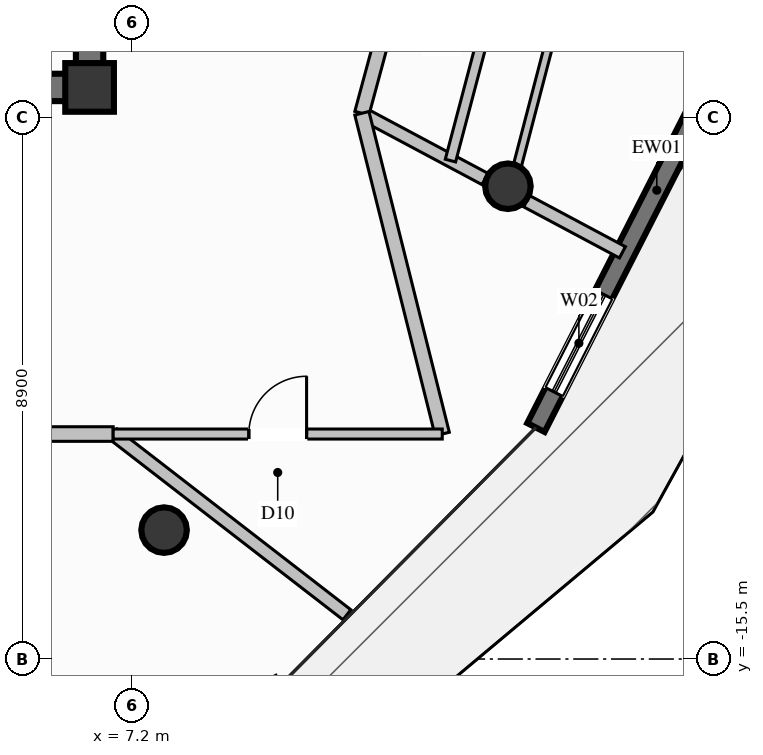
"""IFC4 building model, lengths in metres.
Left out: names, types, materials, properties, quantities, classifications, styles, units other than length and angle.
Written with IfcOpenShell. Run it as: python <this file> out.ifc"""

import sys

from ifc_helpers import new_model, si_unit, direction, frame, frame_2d, origin, origin_2d, place, context, subcontext, project, spatial, rectangle, circle, extrude, element, fill, save


model = new_model("IFC4")
c1 = context("Model", 3, precision=1e-05, world=origin(), true_north=direction((0.0, 1.0)))
c2 = subcontext(c1, "Body", "Model", "MODEL_VIEW")
j1 = project(units=[si_unit("LENGTHUNIT", "METRE"), si_unit("PLANEANGLEUNIT", "RADIAN")], contexts=[c1])
p1 = place(None, origin())
s1 = spatial("IfcSite", under=j1, at=p1, CompositionType="ELEMENT")
p2 = place(p1, origin())
s2 = spatial("IfcBuilding", under=s1, at=p2, CompositionType="ELEMENT")
p3 = place(p2, frame((0.0, 0.0, 282.0)))
s3 = spatial("IfcBuildingStorey", under=s2, at=p3, CompositionType="ELEMENT", Elevation=282.0)
p4 = place(p3, frame((6.5, -6.1, 0.0), z_axis=(0.0, 0.0, 1.0), x_axis=(1.0, 0.0, 0.0)))
e1 = element("IfcColumn", 1, at=p4, inside=s3, PredefinedType="COLUMN", context=c2, shape_type="SweptSolid", body=[
    extrude(rectangle(XDim=0.8, YDim=0.8, at=origin_2d()), origin(), (0.0, 0.0, 1.0), 3.8),
])
p5 = place(p3, frame((4.15, -6.1, 0.0), z_axis=(0.0, 0.0, 1.0), x_axis=(1.0, 0.0, 0.0)))
e2 = element("IfcWall", 2, at=p5, inside=s3, PredefinedType="SHEAR", context=c2, shape_type="SweptSolid", body=[
    extrude(rectangle(XDim=2.125, YDim=0.45, at=frame_2d((1.062, 0.0))), origin(), (0.0, 0.0, 1.0), 3.8),
])
p6 = place(p3, frame((6.5, -6.325, 0.0), z_axis=(0.0, 0.0, 1.0), x_axis=(0.0, 1.0, 0.0)))
e3 = element("IfcWall", 3, at=p6, inside=s3, PredefinedType="SHEAR", context=c2, shape_type="SweptSolid", body=[
    extrude(rectangle(XDim=3.975, YDim=0.45, at=frame_2d((1.987, 0.0))), origin(), (0.0, 0.0, 1.0), 3.8),
])
for number, where, z_axis, x_axis in (
    (4, (7.725, -13.38, 0.0), (0.0, 0.0, 1.0), (1.0, 0.0, 0.0)),
    (5, (13.38, -7.725, 0.0), (0.0, 0.0, 1.0), (1.0, 0.0, 0.0)),
):
    element("IfcColumn", number, at=place(p3, frame(where, z_axis=z_axis, x_axis=x_axis)), inside=s3, PredefinedType="COLUMN", context=c2, shape_type="SweptSolid", body=[
        extrude(circle(Radius=0.375, at=origin_2d()), origin(), (0.0, 0.0, 1.0), 3.8),
    ])
p7 = place(p3, frame((16.588, -6.299, 0.0), z_axis=(0.0, 0.0, 1.0), x_axis=(-0.453783790234, -0.891111817743, 0.0)))
e6 = element("IfcWall", 6, at=p7, inside=s3, PredefinedType="SOLIDWALL", context=c2, shape_type="SweptSolid", body=[
    extrude(rectangle(XDim=6.053, YDim=0.32, at=frame_2d((3.027, 0.0))), origin(), (0.0, 0.0, 1.0), 3.57),
])
p8 = place(p7, frame((3.597, 0.0, 0.35)))
e7 = element("IfcOpeningElement", 7, at=p8, cuts=e6, PredefinedType="OPENING", context=c2, shape_type="SweptSolid", body=[
    extrude(rectangle(XDim=1.8, YDim=2.6, at=frame_2d((0.9, 1.3))), frame((0.0, 0.17, 0.0), z_axis=(0.0, -1.0, 0.0), x_axis=(1.0, 0.0, 0.0)), (0.0, 0.0, 1.0), 0.34),
])
p9 = place(p3, frame((10.978, -6.525, 0.0), z_axis=(0.0, 0.0, 1.0), x_axis=(0.882152653626, -0.470963582138, 0.0)))
e8 = element("IfcWall", 8, at=p9, inside=s3, PredefinedType="PARTITIONING", context=c2, shape_type="SweptSolid", body=[
    extrude(rectangle(XDim=2.295, YDim=0.21, at=frame_2d((1.148, 0.0))), origin(), (0.0, 0.0, 1.0), 3.085),
])
p10 = place(p3, frame((13.689, -7.972, 0.0), z_axis=(0.0, 0.0, 1.0), x_axis=(0.882205167705, -0.470865205844, 0.0)))
e9 = element("IfcWall", 9, at=p10, inside=s3, PredefinedType="PARTITIONING", context=c2, shape_type="SweptSolid", body=[
    extrude(rectangle(XDim=1.784, YDim=0.21, at=frame_2d((0.892, 0.0))), origin(), (0.0, 0.0, 1.0), 3.57),
])
p11 = place(p3, frame((10.978, -6.525, 0.0), z_axis=(0.0, 0.0, 1.0), x_axis=(0.260702780503, 0.965419111183, 0.0)))
e10 = element("IfcWall", 10, at=p11, inside=s3, PredefinedType="PARTITIONING", context=c2, shape_type="SweptSolid", body=[
    extrude(rectangle(XDim=2.773, YDim=0.24, at=frame_2d((1.386, 0.0))), origin(), (0.0, 0.0, 1.0), 3.57),
])
p12 = place(p3, frame((12.435, -7.303, 0.0), z_axis=(0.0, 0.0, 1.0), x_axis=(0.255253529306, 0.966874157156, 0.0)))
e11 = element("IfcWall", 11, at=p12, inside=s3, PredefinedType="PLUMBINGWALL", context=c2, shape_type="SweptSolid", body=[
    extrude(rectangle(XDim=3.13, YDim=0.175, at=frame_2d((1.565, 0.0))), origin(), (0.0, 0.0, 1.0), 3.57),
])
p13 = place(p3, frame((13.42, -7.829, 0.0), z_axis=(0.0, 0.0, 1.0), x_axis=(0.252616340929, 0.967566527065, 0.0)))
e12 = element("IfcWall", 12, at=p13, inside=s3, PredefinedType="PARTITIONING", context=c2, shape_type="SweptSolid", body=[
    extrude(rectangle(XDim=8.024, YDim=0.135, at=frame_2d((4.012, 0.0))), origin(), (0.0, 0.0, 1.0), 3.137),
])
p14 = place(p13, frame((3.537, 0.0, 0.0)))
e13 = element("IfcOpeningElement", 13, at=p14, cuts=e12, PredefinedType="OPENING", context=c2, shape_type="SweptSolid", body=[
    extrude(rectangle(XDim=0.95, YDim=2.1, at=frame_2d((0.475, 1.05))), frame((0.0, 0.078, 0.0), z_axis=(0.0, -1.0, 0.0), x_axis=(1.0, 0.0, 0.0)), (0.0, 0.0, 1.0), 0.155),
])
p15 = place(p3, frame((6.888, -11.8, 0.0), z_axis=(0.0, 0.0, 1.0), x_axis=(0.79112916644, -0.61164911674, 0.0)))
e14 = element("IfcWall", 14, at=p15, inside=s3, PredefinedType="PARTITIONING", context=c2, shape_type="SweptSolid", body=[
    extrude(rectangle(XDim=4.859, YDim=0.21, at=frame_2d((2.429, 0.0))), origin(), (0.0, 0.0, 1.0), 3.57),
])
p16 = place(p3, frame((3.031, -11.8, 0.0), z_axis=(0.0, 0.0, 1.0), x_axis=(1.0, 0.0, 0.0)))
e15 = element("IfcWall", 15, at=p16, inside=s3, PredefinedType="PARTITIONING", context=c2, shape_type="SweptSolid", body=[
    extrude(rectangle(XDim=3.857, YDim=0.24, at=frame_2d((1.928, 0.0))), origin(), (0.0, 0.0, 1.0), 3.57),
])
p17 = place(p16, frame((1.428, 0.0, 0.0)))
e16 = element("IfcOpeningElement", 16, at=p17, cuts=e15, PredefinedType="OPENING", context=c2, shape_type="SweptSolid", body=[
    extrude(rectangle(XDim=1.0, YDim=2.2, at=frame_2d((0.5, 1.1))), frame((0.0, 0.13, 0.0), z_axis=(0.0, -1.0, 0.0), x_axis=(1.0, 0.0, 0.0)), (0.0, 0.0, 1.0), 0.26),
])
p18 = place(p3, frame((12.3, -11.8, 0.0), z_axis=(0.0, 0.0, 1.0), x_axis=(-0.243095426382, 0.970002378179, 0.0)))
e17 = element("IfcWall", 17, at=p18, inside=s3, PredefinedType="PARTITIONING", context=c2, shape_type="SweptSolid", body=[
    extrude(rectangle(XDim=5.438, YDim=0.24, at=frame_2d((2.719, 0.0))), origin(), (0.0, 0.0, 1.0), 3.57),
])
p19 = place(p3, frame((6.888, -11.8, 0.0), z_axis=(0.0, 0.0, 1.0), x_axis=(1.0, 0.0, 0.0)))
e18 = element("IfcWall", 18, at=p19, inside=s3, PredefinedType="PARTITIONING", context=c2, shape_type="SweptSolid", body=[
    extrude(rectangle(XDim=5.412, YDim=0.165, at=frame_2d((2.706, 0.0))), origin(), (0.0, 0.0, 1.0), 3.57),
])
p20 = place(p19, frame((2.231, 0.0, 0.0)))
e19 = element("IfcOpeningElement", 19, at=p20, cuts=e18, PredefinedType="OPENING", context=c2, shape_type="SweptSolid", body=[
    extrude(rectangle(XDim=0.95, YDim=2.1, at=frame_2d((0.475, 1.05))), frame((0.0, 0.093, 0.0), z_axis=(0.0, -1.0, 0.0), x_axis=(1.0, 0.0, 0.0)), (0.0, 0.0, 1.0), 0.185),
])
p21 = place(p8, origin())
e20 = element("IfcWindow", 20, at=p21, inside=s3, PartitioningType="SINGLE_PANEL", PredefinedType="WINDOW", context=c2, shape_type="SweptSolid", body=[
    extrude(rectangle(XDim=1.8, YDim=2.6, at=frame_2d((0.9, 1.3))), frame((0.0, 0.03, 0.0), z_axis=(0.0, -1.0, 0.0), x_axis=(1.0, 0.0, 0.0)), (0.0, 0.0, 1.0), 0.06),
])
fill(e7, e20)
p22 = place(p20, origin())
e21 = element("IfcDoor", 21, at=p22, inside=s3, OperationType="SINGLE_SWING_RIGHT", PredefinedType="DOOR", context=c2, shape_type="SweptSolid", body=[
    extrude(rectangle(XDim=0.95, YDim=2.1, at=frame_2d((0.475, 1.05))), frame((0.0, 0.025, 0.0), z_axis=(0.0, -1.0, 0.0), x_axis=(1.0, 0.0, 0.0)), (0.0, 0.0, 1.0), 0.05),
])
fill(e19, e21)
save(model, sys.argv[1])
